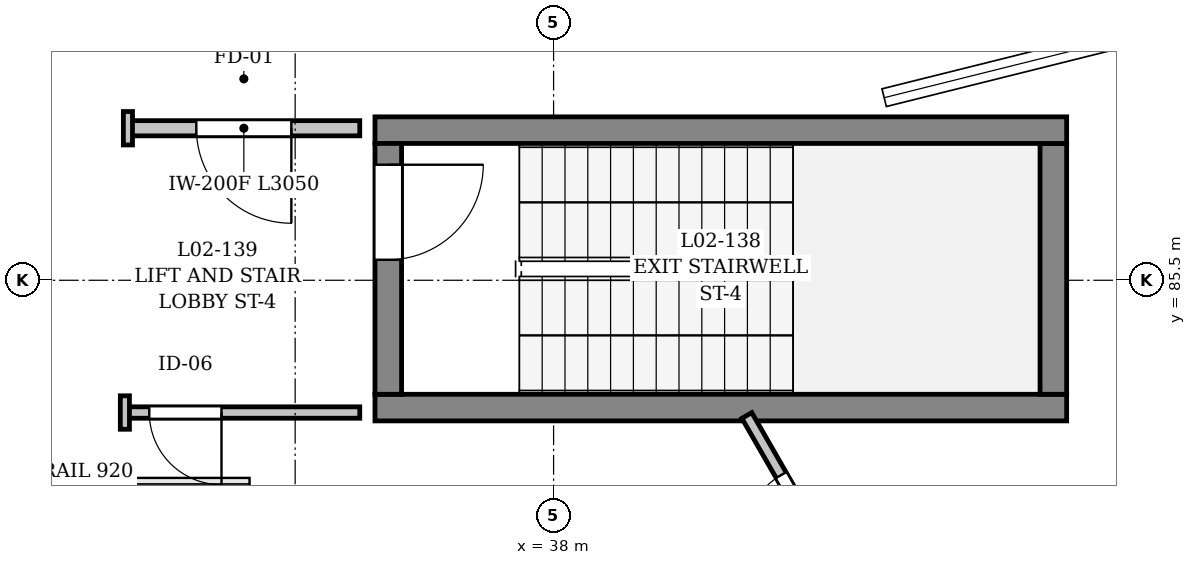
"""IFC4 building model, lengths in metres.
Left out: names, types, materials, properties, quantities, classifications, styles, units other than length and angle.
Written with IfcOpenShell. Run it as: python <this file> out.ifc"""

import sys

from ifc_helpers import new_model, si_unit, direction, frame, frame_2d, origin, place, context, subcontext, project, spatial, rectangle, extrude, element, fill, save


model = new_model("IFC4")
c1 = context("Model", 3, precision=1e-05, world=origin(), true_north=direction((0.0, 1.0)))
c2 = subcontext(c1, "Body", "Model", "MODEL_VIEW")
j1 = project(units=[si_unit("LENGTHUNIT", "METRE"), si_unit("PLANEANGLEUNIT", "RADIAN")], contexts=[c1])
p1 = place(None, origin())
s1 = spatial("IfcSite", under=j1, at=p1, CompositionType="ELEMENT")
p2 = place(p1, origin())
s2 = spatial("IfcBuilding", under=s1, at=p2, CompositionType="ELEMENT")
p3 = place(p2, frame((0.0, 0.0, 5.4)))
s3 = spatial("IfcBuildingStorey", under=s2, at=p3, CompositionType="ELEMENT", Elevation=5.4)
p4 = place(p3, frame((27.739, 83.652, 0.0), z_axis=(0.0, 0.0, 1.0), x_axis=(0.719337111916, -0.694661154392, 0.0)))
e1 = element("IfcWall", 1, at=p4, inside=s3, PredefinedType="SOLIDWALL", context=c2, shape_type="SweptSolid", body=[
    extrude(rectangle(XDim=10.003, YDim=0.5, at=frame_2d((5.001, 0.0))), origin(), (0.0, 0.0, 1.0), 4.52),
])
p5 = place(p4, frame((1.802, 0.0, 0.9)))
e2 = element("IfcOpeningElement", 2, at=p5, cuts=e1, PredefinedType="OPENING", context=c2, shape_type="SweptSolid", body=[
    extrude(rectangle(XDim=2.4, YDim=1.1, at=frame_2d((1.2, 0.55))), frame((0.0, 0.26, 0.0), z_axis=(0.0, -1.0, 0.0), x_axis=(1.0, 0.0, 0.0)), (0.0, 0.0, 1.0), 0.52),
])
p6 = place(p4, frame((5.802, 0.0, 0.9)))
e3 = element("IfcOpeningElement", 3, at=p6, cuts=e1, PredefinedType="OPENING", context=c2, shape_type="SweptSolid", body=[
    extrude(rectangle(XDim=2.4, YDim=1.1, at=frame_2d((1.2, 0.55))), frame((0.0, 0.26, 0.0), z_axis=(0.0, -1.0, 0.0), x_axis=(1.0, 0.0, 0.0)), (0.0, 0.0, 1.0), 0.52),
])
p7 = place(p3, frame((33.66, 79.213, 0.0), z_axis=(0.0, 0.0, 1.0), x_axis=(-0.719335980864, 0.694662325619, 0.0)))
e4 = element("IfcWall", 4, at=p7, inside=s3, PredefinedType="SOLIDWALL", context=c2, shape_type="SweptSolid", body=[
    extrude(rectangle(XDim=18.632, YDim=0.45, at=frame_2d((9.316, 0.0))), origin(), (0.0, 0.0, 1.0), 4.5),
])
p8 = place(p7, frame((3.216, 0.0, 0.9)))
e5 = element("IfcOpeningElement", 5, at=p8, cuts=e4, PredefinedType="OPENING", context=c2, shape_type="SweptSolid", body=[
    extrude(rectangle(XDim=1.4, YDim=2.05, at=frame_2d((0.7, 1.025))), frame((0.0, 0.235, 0.0), z_axis=(0.0, -1.0, 0.0), x_axis=(1.0, 0.0, 0.0)), (0.0, 0.0, 1.0), 0.47),
])
p9 = place(p7, frame((6.816, 0.0, 0.9)))
e6 = element("IfcOpeningElement", 6, at=p9, cuts=e4, PredefinedType="OPENING", context=c2, shape_type="SweptSolid", body=[
    extrude(rectangle(XDim=1.4, YDim=2.05, at=frame_2d((0.7, 1.025))), frame((0.0, 0.235, 0.0), z_axis=(0.0, -1.0, 0.0), x_axis=(1.0, 0.0, 0.0)), (0.0, 0.0, 1.0), 0.47),
])
p10 = place(p7, frame((10.416, 0.0, 0.9)))
e7 = element("IfcOpeningElement", 7, at=p10, cuts=e4, PredefinedType="OPENING", context=c2, shape_type="SweptSolid", body=[
    extrude(rectangle(XDim=1.4, YDim=2.05, at=frame_2d((0.7, 1.025))), frame((0.0, 0.235, 0.0), z_axis=(0.0, -1.0, 0.0), x_axis=(1.0, 0.0, 0.0)), (0.0, 0.0, 1.0), 0.47),
])
p11 = place(p7, frame((14.016, 0.0, 0.9)))
e8 = element("IfcOpeningElement", 8, at=p11, cuts=e4, PredefinedType="OPENING", context=c2, shape_type="SweptSolid", body=[
    extrude(rectangle(XDim=1.4, YDim=2.05, at=frame_2d((0.7, 1.025))), frame((0.0, 0.235, 0.0), z_axis=(0.0, -1.0, 0.0), x_axis=(1.0, 0.0, 0.0)), (0.0, 0.0, 1.0), 0.47),
])
p12 = place(p3, frame((35.65, 83.825, 0.0), z_axis=(0.0, 0.0, 1.0), x_axis=(1.0, 0.0, 0.0)))
e9 = element("IfcWall", 9, at=p12, inside=s3, PredefinedType="SHEAR", context=c2, shape_type="SweptSolid", body=[
    extrude(rectangle(XDim=9.1, YDim=0.35, at=frame_2d((4.55, 0.0))), origin(), (0.0, 0.0, 1.0), 4.5),
])
p13 = place(p3, frame((44.575, 84.0, 0.0), z_axis=(0.0, 0.0, 1.0), x_axis=(0.0, 1.0, 0.0)))
e10 = element("IfcWall", 10, at=p13, inside=s3, PredefinedType="SHEAR", context=c2, shape_type="SweptSolid", body=[
    extrude(rectangle(XDim=3.3, YDim=0.35, at=frame_2d((1.65, 0.0))), origin(), (0.0, 0.0, 1.0), 4.5),
])
p14 = place(p3, frame((44.75, 87.475, 0.0), z_axis=(0.0, 0.0, 1.0), x_axis=(-1.0, 0.0, 0.0)))
e11 = element("IfcWall", 11, at=p14, inside=s3, PredefinedType="SHEAR", context=c2, shape_type="SweptSolid", body=[
    extrude(rectangle(XDim=9.1, YDim=0.35, at=frame_2d((4.55, 0.0))), origin(), (0.0, 0.0, 1.0), 4.5),
])
p15 = place(p3, frame((35.825, 87.3, 0.0), z_axis=(0.0, 0.0, 1.0), x_axis=(0.0, -1.0, 0.0)))
e12 = element("IfcWall", 12, at=p15, inside=s3, PredefinedType="SHEAR", context=c2, shape_type="SweptSolid", body=[
    extrude(rectangle(XDim=3.3, YDim=0.35, at=frame_2d((1.65, 0.0))), origin(), (0.0, 0.0, 1.0), 4.5),
])
p16 = place(p15, frame((0.28, 0.0, 0.0)))
e13 = element("IfcOpeningElement", 13, at=p16, cuts=e12, PredefinedType="OPENING", context=c2, shape_type="SweptSolid", body=[
    extrude(rectangle(XDim=1.25, YDim=2.2, at=frame_2d((0.625, 1.1))), frame((0.0, 0.185, 0.0), z_axis=(0.0, -1.0, 0.0), x_axis=(1.0, 0.0, 0.0)), (0.0, 0.0, 1.0), 0.37),
])
p17 = place(p3, frame((35.45, 87.5, 0.0), z_axis=(0.0, 0.0, 1.0), x_axis=(-1.0, 0.0, 0.0)))
e14 = element("IfcWall", 14, at=p17, inside=s3, PredefinedType="PARTITIONING", context=c2, shape_type="SweptSolid", body=[
    extrude(rectangle(XDim=3.05, YDim=0.2, at=frame_2d((1.525, 0.0))), origin(), (0.0, 0.0, 1.0), 3.59),
])
p18 = place(p17, frame((0.9, 0.0, 0.0)))
e15 = element("IfcOpeningElement", 15, at=p18, cuts=e14, PredefinedType="OPENING", context=c2, shape_type="SweptSolid", body=[
    extrude(rectangle(XDim=1.25, YDim=2.2, at=frame_2d((0.625, 1.1))), frame((0.0, 0.11, 0.0), z_axis=(0.0, -1.0, 0.0), x_axis=(1.0, 0.0, 0.0)), (0.0, 0.0, 1.0), 0.22),
])
p19 = place(p3, frame((35.45, 83.76, 0.0), z_axis=(0.0, 0.0, 1.0), x_axis=(-1.0, 0.0, 0.0)))
e16 = element("IfcWall", 16, at=p19, inside=s3, PredefinedType="PARTITIONING", context=c2, shape_type="SweptSolid", body=[
    extrude(rectangle(XDim=3.09, YDim=0.15, at=frame_2d((1.545, 0.0))), origin(), (0.0, 0.0, 1.0), 3.89),
])
p20 = place(p19, frame((1.819, 0.0, 0.0)))
e17 = element("IfcOpeningElement", 17, at=p20, cuts=e16, PredefinedType="OPENING", context=c2, shape_type="SweptSolid", body=[
    extrude(rectangle(XDim=0.95, YDim=2.2, at=frame_2d((0.475, 1.1))), frame((0.0, 0.085, 0.0), z_axis=(0.0, -1.0, 0.0), x_axis=(1.0, 0.0, 0.0)), (0.0, 0.0, 1.0), 0.17),
])
p21 = place(p3, frame((41.857, 81.434, 0.0), z_axis=(0.0, 0.0, 1.0), x_axis=(-0.49846938543, 0.866907302882, 0.0)))
e18 = element("IfcWall", 18, at=p21, inside=s3, PredefinedType="PARTITIONING", context=c2, shape_type="SweptSolid", body=[
    extrude(rectangle(XDim=2.638, YDim=0.15, at=frame_2d((1.319, 0.0))), origin(), (0.0, 0.0, 1.0), 4.5),
])
p22 = place(p21, frame((0.783, 0.0, 0.0)))
e19 = element("IfcOpeningElement", 19, at=p22, cuts=e18, PredefinedType="OPENING", context=c2, shape_type="SweptSolid", body=[
    extrude(rectangle(XDim=0.95, YDim=2.2, at=frame_2d((0.475, 1.1))), frame((0.0, 0.085, 0.0), z_axis=(0.0, -1.0, 0.0), x_axis=(1.0, 0.0, 0.0)), (0.0, 0.0, 1.0), 0.17),
])
p23 = place(p3, frame((32.4, 87.72, 0.0), z_axis=(0.0, 0.0, 1.0), x_axis=(0.0, -1.0, 0.0)))
e20 = element("IfcWall", 20, at=p23, inside=s3, PredefinedType="PARTITIONING", context=c2, shape_type="SweptSolid", body=[
    extrude(rectangle(XDim=0.44, YDim=0.12, at=frame_2d((0.22, 0.0))), origin(), (0.0, 0.0, 1.0), 4.5),
])
p24 = place(p3, frame((32.36, 83.98, 0.0), z_axis=(0.0, 0.0, 1.0), x_axis=(0.0, -1.0, 0.0)))
e21 = element("IfcWall", 21, at=p24, inside=s3, PredefinedType="PARTITIONING", context=c2, shape_type="SweptSolid", body=[
    extrude(rectangle(XDim=0.44, YDim=0.12, at=frame_2d((0.22, 0.0))), origin(), (0.0, 0.0, 1.0), 3.89),
])
p25 = place(p16, origin())
e22 = element("IfcDoor", 22, at=p25, inside=s3, OperationType="SINGLE_SWING_LEFT", PredefinedType="DOOR", context=c2, shape_type="SweptSolid", body=[
    extrude(rectangle(XDim=1.25, YDim=2.2, at=frame_2d((0.625, 1.1))), frame((0.0, 0.025, 0.0), z_axis=(0.0, -1.0, 0.0), x_axis=(1.0, 0.0, 0.0)), (0.0, 0.0, 1.0), 0.05),
])
fill(e13, e22)
p26 = place(p18, origin())
e23 = element("IfcDoor", 23, at=p26, inside=s3, OperationType="SINGLE_SWING_LEFT", PredefinedType="DOOR", context=c2, shape_type="SweptSolid", body=[
    extrude(rectangle(XDim=1.25, YDim=2.2, at=frame_2d((0.625, 1.1))), frame((0.0, 0.025, 0.0), z_axis=(0.0, -1.0, 0.0), x_axis=(1.0, 0.0, 0.0)), (0.0, 0.0, 1.0), 0.05),
])
fill(e15, e23)
p27 = place(p20, origin())
e24 = element("IfcDoor", 24, at=p27, inside=s3, OperationType="SINGLE_SWING_LEFT", PredefinedType="DOOR", context=c2, shape_type="SweptSolid", body=[
    extrude(rectangle(XDim=0.95, YDim=2.2, at=frame_2d((0.475, 1.1))), frame((0.0, 0.025, 0.0), z_axis=(0.0, -1.0, 0.0), x_axis=(1.0, 0.0, 0.0)), (0.0, 0.0, 1.0), 0.05),
])
fill(e17, e24)
p28 = place(p22, origin())
e25 = element("IfcDoor", 25, at=p28, inside=s3, OperationType="SINGLE_SWING_RIGHT", PredefinedType="DOOR", context=c2, shape_type="SweptSolid", body=[
    extrude(rectangle(XDim=0.95, YDim=2.2, at=frame_2d((0.475, 1.1))), frame((0.0, 0.025, 0.0), z_axis=(0.0, -1.0, 0.0), x_axis=(1.0, 0.0, 0.0)), (0.0, 0.0, 1.0), 0.05),
])
fill(e19, e25)
save(model, sys.argv[1])
